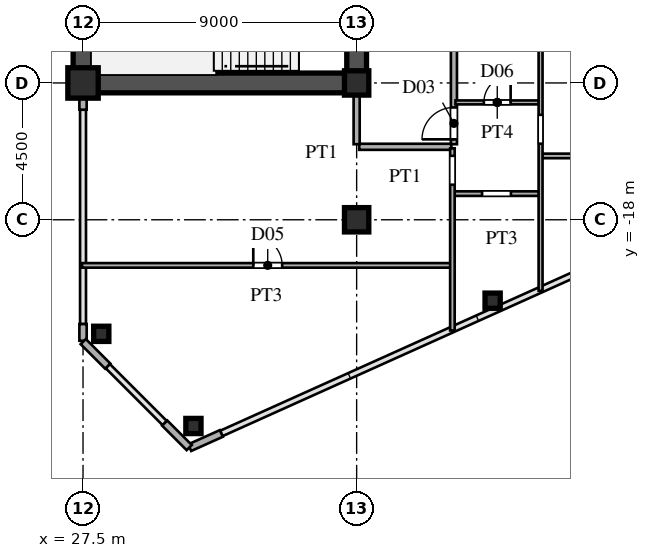
"""IFC4 building model, lengths in metres.
Left out: names, types, materials, properties, quantities, classifications, styles, units other than length and angle.
Written with IfcOpenShell. Run it as: python <this file> out.ifc"""

import sys

from ifc_helpers import new_model, si_unit, direction, frame, frame_2d, origin, origin_2d, place, context, subcontext, project, spatial, rectangle, hollow_rectangle, i_section, extrude, source, transform, mapped, element, fill, save


model = new_model("IFC4")
c1 = context("Model", 3, precision=1e-05, world=origin(), true_north=direction((0.0, 1.0)))
c2 = subcontext(c1, "Body", "Model", "MODEL_VIEW")
j1 = project(units=[si_unit("LENGTHUNIT", "METRE"), si_unit("PLANEANGLEUNIT", "RADIAN")], contexts=[c1])
p1 = place(None, origin())
s1 = spatial("IfcSite", under=j1, at=p1, CompositionType="ELEMENT")
p2 = place(p1, origin())
s2 = spatial("IfcBuilding", under=s1, at=p2, CompositionType="ELEMENT")
p3 = place(p2, frame((0.0, 0.0, 62.1)))
s3 = spatial("IfcBuildingStorey", under=s2, at=p3, CompositionType="ELEMENT", Elevation=62.1)
m1 = source(origin(), c2, "Body", "SweptSolid", [
    extrude(hollow_rectangle(XDim=1.0, YDim=1.0, WallThickness=0.042, at=origin_2d()), origin(), (0.0, 0.0, 1.0), 3.6),
])
p4 = place(p3, frame((27.5, -13.5, 0.0), z_axis=(0.0, 0.0, 1.0), x_axis=(1.0, 0.0, 0.0)))
e1 = element("IfcColumn", 1, at=p4, inside=s3, PredefinedType="COLUMN", context=c2, shape_type="MappedRepresentation", body=[
    mapped(m1, transform((0.0, 0.0, 0.0), scale=1.0)),
])
m2 = source(origin(), c2, "Body", "SweptSolid", [
    extrude(i_section(OverallWidth=0.8, OverallDepth=0.8, WebThickness=0.032, FlangeThickness=0.05, at=origin_2d()), origin(), (0.0, 0.0, 1.0), 3.6),
])
for number, where, z_axis, x_axis in (
    (2, (36.5, -18.0, 0.0), (0.0, 0.0, 1.0), (1.0, 0.0, 0.0)),
    (3, (36.5, -13.5, 0.0), (0.0, 0.0, 1.0), (1.0, 0.0, 0.0)),
):
    element("IfcColumn", number, at=place(p3, frame(where, z_axis=z_axis, x_axis=x_axis)), inside=s3, PredefinedType="COLUMN", context=c2, shape_type="MappedRepresentation", body=[
        mapped(m2, transform((0.0, 0.0, 0.0), scale=1.0)),
    ])
m3 = source(origin(), c2, "Body", "SweptSolid", [
    extrude(hollow_rectangle(XDim=0.5, YDim=0.5, WallThickness=0.02, at=origin_2d()), origin(), (0.0, 0.0, 1.0), 3.6),
])
for number, where, z_axis, x_axis in (
    (4, (31.131, -24.783, 0.0), (0.0, 0.0, 1.0), (1.0, 0.0, 0.0)),
    (5, (28.1, -21.751, 0.0), (0.0, 0.0, 1.0), (1.0, 0.0, 0.0)),
    (6, (40.973, -20.661, 0.0), (0.0, 0.0, 1.0), (1.0, 0.0, 0.0)),
):
    element("IfcColumn", number, at=place(p3, frame(where, z_axis=z_axis, x_axis=x_axis)), inside=s3, PredefinedType="COLUMN", context=c2, shape_type="MappedRepresentation", body=[
        mapped(m3, transform((0.0, 0.0, 0.0), scale=1.0)),
    ])
p5 = place(p3, frame((31.009, -25.496, 0.0), z_axis=(0.0, 0.0, 1.0), x_axis=(0.911929519623, 0.410346866979, 0.0)))
e7 = element("IfcWall", 7, at=p5, inside=s3, PredefinedType="SOLIDWALL", context=c2, shape_type="SweptSolid", body=[
    extrude(rectangle(XDim=1.14, YDim=0.24, at=frame_2d((0.57, 0.0))), origin(), (0.0, 0.0, 1.0), 3.38),
])
p6 = place(p3, frame((27.5, -21.98, 0.0), z_axis=(0.0, 0.0, 1.0), x_axis=(0.0, 1.0, 0.0)))
e8 = element("IfcWall", 8, at=p6, inside=s3, PredefinedType="SOLIDWALL", context=c2, shape_type="SweptSolid", body=[
    extrude(rectangle(XDim=0.55, YDim=0.24, at=frame_2d((0.275, 0.0))), origin(), (0.0, 0.0, 1.0), 3.38),
])
p7 = place(p3, frame((27.5, -14.38, 0.0), z_axis=(0.0, 0.0, 1.0), x_axis=(0.0, 1.0, 0.0)))
e9 = element("IfcWall", 9, at=p7, inside=s3, PredefinedType="SOLIDWALL", context=c2, shape_type="SweptSolid", body=[
    extrude(rectangle(XDim=0.55, YDim=0.24, at=frame_2d((0.275, 0.0))), origin(), (0.0, 0.0, 1.0), 2.88),
])
for number, where, z_axis, x_axis in (
    (10, (27.507, -22.007, 0.0), (0.0, 0.0, 1.0), (0.707, -0.707, 0.0)),
    (11, (30.187, -24.687, 0.0), (0.0, 0.0, 1.0), (0.707, -0.707, 0.0)),
):
    element("IfcWall", number, at=place(p3, frame(where, z_axis=z_axis, x_axis=x_axis)), inside=s3, PredefinedType="SOLIDWALL", context=c2, shape_type="SweptSolid", body=[
        extrude(rectangle(XDim=1.14, YDim=0.24, at=frame_2d((0.57, 0.0))), origin(), (0.0, 0.0, 1.0), 3.38),
    ])
p8 = place(p3, frame((27.5, -13.5, 0.0), z_axis=(0.0, 0.0, 1.0), x_axis=(0.0, 1.0, 0.0)))
e12 = element("IfcWall", 12, at=p8, inside=s3, PredefinedType="SHEAR", context=c2, shape_type="SweptSolid", body=[
    extrude(rectangle(XDim=12.2, YDim=0.65, at=frame_2d((6.1, 0.0))), origin(), (0.0, 0.0, 1.0), 3.38),
])
p9 = place(p3, frame((27.5, -13.5, 0.0), z_axis=(0.0, 0.0, 1.0), x_axis=(1.0, 0.0, 0.0)))
e13 = element("IfcWall", 13, at=p9, inside=s3, PredefinedType="SHEAR", context=c2, shape_type="SweptSolid", body=[
    extrude(rectangle(XDim=9.0, YDim=0.65, at=frame_2d((4.5, 0.0))), origin(), (0.0, 0.0, 1.0), 3.38),
])
p10 = place(p3, frame((36.5, -13.65, 0.0), z_axis=(0.0, 0.0, 1.0), x_axis=(0.0, 1.0, 0.0)))
e14 = element("IfcWall", 14, at=p10, inside=s3, PredefinedType="SHEAR", context=c2, shape_type="SweptSolid", body=[
    extrude(rectangle(XDim=7.15, YDim=0.65, at=frame_2d((3.575, 0.0))), origin(), (0.0, 0.0, 1.0), 3.38),
])
p11 = place(p10, frame((4.675, 0.0, 0.0)))
e15 = element("IfcOpeningElement", 15, at=p11, cuts=e14, PredefinedType="OPENING", context=c2, shape_type="SweptSolid", body=[
    extrude(rectangle(XDim=1.15, YDim=2.2, at=frame_2d((0.575, 1.1))), frame((0.0, 0.335, 0.0), z_axis=(0.0, -1.0, 0.0), x_axis=(1.0, 0.0, 0.0)), (0.0, 0.0, 1.0), 0.67),
])
p12 = place(p3, frame((27.465, -19.5, 0.0), z_axis=(0.0, 0.0, 1.0), x_axis=(1.0, 0.0, 0.0)))
e16 = element("IfcWall", 16, at=p12, inside=s3, PredefinedType="PARTITIONING", context=c2, shape_type="SweptSolid", body=[
    extrude(rectangle(XDim=12.135, YDim=0.15, at=frame_2d((6.067, 0.0))), origin(), (0.0, 0.0, 1.0), 3.38),
])
p13 = place(p12, frame((5.635, 0.0, 0.0)))
e17 = element("IfcOpeningElement", 17, at=p13, cuts=e16, PredefinedType="OPENING", context=c2, shape_type="SweptSolid", body=[
    extrude(rectangle(XDim=0.95, YDim=2.15, at=frame_2d((0.475, 1.075))), frame((0.0, 0.085, 0.0), z_axis=(0.0, -1.0, 0.0), x_axis=(1.0, 0.0, 0.0)), (0.0, 0.0, 1.0), 0.17),
])
p14 = place(p3, frame((39.7, -17.14, 0.0), z_axis=(0.0, 0.0, 1.0), x_axis=(1.0, 0.0, 0.0)))
e18 = element("IfcWall", 18, at=p14, inside=s3, PredefinedType="PARTITIONING", context=c2, shape_type="SweptSolid", body=[
    extrude(rectangle(XDim=2.8, YDim=0.15, at=frame_2d((1.4, 0.0))), origin(), (0.0, 0.0, 1.0), 3.38),
])
p15 = place(p14, frame((0.925, 0.0, 0.0)))
e19 = element("IfcOpeningElement", 19, at=p15, cuts=e18, PredefinedType="OPENING", context=c2, shape_type="SweptSolid", body=[
    extrude(rectangle(XDim=0.95, YDim=2.15, at=frame_2d((0.475, 1.075))), frame((0.0, 0.085, 0.0), z_axis=(0.0, -1.0, 0.0), x_axis=(1.0, 0.0, 0.0)), (0.0, 0.0, 1.0), 0.17),
])
p16 = place(p3, frame((42.6, -15.9, 0.0), z_axis=(0.0, 0.0, 1.0), x_axis=(1.0, 0.0, 0.0)))
e20 = element("IfcWall", 20, at=p16, inside=s3, PredefinedType="PARTITIONING", context=c2, shape_type="SweptSolid", body=[
    extrude(rectangle(XDim=9.765, YDim=0.15, at=frame_2d((4.882, 0.0))), origin(), (0.0, 0.0, 1.0), 3.38),
])
p17 = place(p16, frame((4.365, 0.0, 0.0)))
e21 = element("IfcOpeningElement", 21, at=p17, cuts=e20, PredefinedType="OPENING", context=c2, shape_type="SweptSolid", body=[
    extrude(rectangle(XDim=0.95, YDim=2.15, at=frame_2d((0.475, 1.075))), frame((0.0, 0.085, 0.0), z_axis=(0.0, -1.0, 0.0), x_axis=(1.0, 0.0, 0.0)), (0.0, 0.0, 1.0), 0.17),
])
p18 = place(p3, frame((36.585, -15.6, 0.0), z_axis=(0.0, 0.0, 1.0), x_axis=(1.0, 0.0, 0.0)))
e22 = element("IfcWall", 22, at=p18, inside=s3, PredefinedType="PARTITIONING", context=c2, shape_type="SweptSolid", body=[
    extrude(rectangle(XDim=3.03, YDim=0.2, at=frame_2d((1.515, 0.0))), origin(), (0.0, 0.0, 1.0), 3.38),
])
p19 = place(p3, frame((39.75, -14.14, 0.0), z_axis=(0.0, 0.0, 1.0), x_axis=(1.0, 0.0, 0.0)))
e23 = element("IfcWall", 23, at=p19, inside=s3, PredefinedType="PARTITIONING", context=c2, shape_type="SweptSolid", body=[
    extrude(rectangle(XDim=2.75, YDim=0.13, at=frame_2d((1.375, 0.0))), origin(), (0.0, 0.0, 1.0), 3.38),
])
p20 = place(p19, frame((0.935, 0.0, 0.0)))
e24 = element("IfcOpeningElement", 24, at=p20, cuts=e23, PredefinedType="OPENING", context=c2, shape_type="SweptSolid", body=[
    extrude(rectangle(XDim=0.88, YDim=2.1, at=frame_2d((0.44, 1.05))), frame((0.0, 0.075, 0.0), z_axis=(0.0, -1.0, 0.0), x_axis=(1.0, 0.0, 0.0)), (0.0, 0.0, 1.0), 0.15),
])
p21 = place(p3, frame((36.5, -15.515, 0.0), z_axis=(0.0, 0.0, 1.0), x_axis=(0.0, 1.0, 0.0)))
e25 = element("IfcWall", 25, at=p21, inside=s3, PredefinedType="PARTITIONING", context=c2, shape_type="SweptSolid", body=[
    extrude(rectangle(XDim=1.685, YDim=0.2, at=frame_2d((0.842, 0.0))), origin(), (0.0, 0.0, 1.0), 2.68),
])
p22 = place(p3, frame((39.65, -21.642, 0.0), z_axis=(0.0, 0.0, 1.0), x_axis=(0.0, 1.0, 0.0)))
e26 = element("IfcWall", 26, at=p22, inside=s3, PredefinedType="PARTITIONING", context=c2, shape_type="SweptSolid", body=[
    extrude(rectangle(XDim=5.992, YDim=0.15, at=frame_2d((2.996, 0.0))), origin(), (0.0, 0.0, 1.0), 3.38),
])
p23 = place(p22, frame((4.794, 0.0, 0.0)))
e27 = element("IfcOpeningElement", 27, at=p23, cuts=e26, PredefinedType="OPENING", context=c2, shape_type="SweptSolid", body=[
    extrude(rectangle(XDim=0.95, YDim=2.15, at=frame_2d((0.475, 1.075))), frame((0.0, 0.085, 0.0), z_axis=(0.0, -1.0, 0.0), x_axis=(1.0, 0.0, 0.0)), (0.0, 0.0, 1.0), 0.17),
])
p24 = place(p3, frame((39.7, -15.515, 0.0), z_axis=(0.0, 0.0, 1.0), x_axis=(0.0, 1.0, 0.0)))
e28 = element("IfcWall", 28, at=p24, inside=s3, PredefinedType="PARTITIONING", context=c2, shape_type="SweptSolid", body=[
    extrude(rectangle(XDim=31.03, YDim=0.2, at=frame_2d((15.515, 0.0))), origin(), (0.0, 0.0, 1.0), 3.38),
])
p25 = place(p24, frame((0.16, 0.0, 0.0)))
e29 = element("IfcOpeningElement", 29, at=p25, cuts=e28, PredefinedType="OPENING", context=c2, shape_type="SweptSolid", body=[
    extrude(rectangle(XDim=1.05, YDim=2.25, at=frame_2d((0.525, 1.125))), frame((0.0, 0.11, 0.0), z_axis=(0.0, -1.0, 0.0), x_axis=(1.0, 0.0, 0.0)), (0.0, 0.0, 1.0), 0.22),
])
p26 = place(p24, frame((10.28, 0.0, 0.0)))
e30 = element("IfcOpeningElement", 30, at=p26, cuts=e28, PredefinedType="OPENING", context=c2, shape_type="SweptSolid", body=[
    extrude(rectangle(XDim=1.05, YDim=2.25, at=frame_2d((0.525, 1.125))), frame((0.0, 0.11, 0.0), z_axis=(0.0, -1.0, 0.0), x_axis=(1.0, 0.0, 0.0)), (0.0, 0.0, 1.0), 0.22),
])
p27 = place(p24, frame((24.067, 0.0, 0.0)))
e31 = element("IfcOpeningElement", 31, at=p27, cuts=e28, PredefinedType="OPENING", context=c2, shape_type="SweptSolid", body=[
    extrude(rectangle(XDim=1.05, YDim=2.25, at=frame_2d((0.525, 1.125))), frame((0.0, 0.11, 0.0), z_axis=(0.0, -1.0, 0.0), x_axis=(1.0, 0.0, 0.0)), (0.0, 0.0, 1.0), 0.22),
])
p28 = place(p3, frame((42.55, -20.337, 0.0), z_axis=(0.0, 0.0, 1.0), x_axis=(0.0, 1.0, 0.0)))
e32 = element("IfcWall", 32, at=p28, inside=s3, PredefinedType="PARTITIONING", context=c2, shape_type="SweptSolid", body=[
    extrude(rectangle(XDim=18.12, YDim=0.13, at=frame_2d((9.06, 0.0))), origin(), (0.0, 0.0, 1.0), 3.38),
])
p29 = place(p28, frame((4.839, 0.0, 0.0)))
e33 = element("IfcOpeningElement", 33, at=p29, cuts=e32, PredefinedType="OPENING", context=c2, shape_type="SweptSolid", body=[
    extrude(rectangle(XDim=0.95, YDim=2.15, at=frame_2d((0.475, 1.075))), frame((0.0, 0.075, 0.0), z_axis=(0.0, -1.0, 0.0), x_axis=(1.0, 0.0, 0.0)), (0.0, 0.0, 1.0), 0.15),
])
p30 = place(p28, frame((15.362, 0.0, 0.0)))
e34 = element("IfcOpeningElement", 34, at=p30, cuts=e32, PredefinedType="OPENING", context=c2, shape_type="SweptSolid", body=[
    extrude(rectangle(XDim=0.95, YDim=2.15, at=frame_2d((0.475, 1.075))), frame((0.0, 0.075, 0.0), z_axis=(0.0, -1.0, 0.0), x_axis=(1.0, 0.0, 0.0)), (0.0, 0.0, 1.0), 0.15),
])
m4 = source(origin(), c2, "Body", "SweptSolid", [
    extrude(rectangle(XDim=0.95, YDim=2.15, at=frame_2d((0.475, 1.075))), frame((0.0, 0.025, 0.0), z_axis=(0.0, -1.0, 0.0), x_axis=(1.0, 0.0, 0.0)), (0.0, 0.0, 1.0), 0.05),
])
p31 = place(p13, origin())
e35 = element("IfcDoor", 35, at=p31, inside=s3, OperationType="SINGLE_SWING_LEFT", PredefinedType="DOOR", context=c2, shape_type="MappedRepresentation", body=[
    mapped(m4, transform((0.0, 0.0, 0.0), scale=1.0)),
])
fill(e17, e35)
m5 = source(origin(), c2, "Body", "SweptSolid", [
    extrude(rectangle(XDim=0.88, YDim=2.1, at=frame_2d((0.44, 1.05))), frame((0.0, 0.025, 0.0), z_axis=(0.0, -1.0, 0.0), x_axis=(1.0, 0.0, 0.0)), (0.0, 0.0, 1.0), 0.05),
])
p32 = place(p20, origin())
e36 = element("IfcDoor", 36, at=p32, inside=s3, OperationType="SINGLE_SWING_RIGHT", PredefinedType="DOOR", context=c2, shape_type="MappedRepresentation", body=[
    mapped(m5, transform((0.0, 0.0, 0.0), scale=1.0)),
])
fill(e24, e36)
m6 = source(origin(), c2, "Body", "SweptSolid", [
    extrude(rectangle(XDim=1.05, YDim=2.25, at=frame_2d((0.525, 1.125))), frame((0.0, 0.025, 0.0), z_axis=(0.0, -1.0, 0.0), x_axis=(1.0, 0.0, 0.0)), (0.0, 0.0, 1.0), 0.05),
])
p33 = place(p25, origin())
e37 = element("IfcDoor", 37, at=p33, inside=s3, OperationType="SINGLE_SWING_LEFT", PredefinedType="DOOR", context=c2, shape_type="MappedRepresentation", body=[
    mapped(m6, transform((0.0, 0.0, 0.0), scale=1.0)),
])
fill(e29, e37)
save(model, sys.argv[1])
